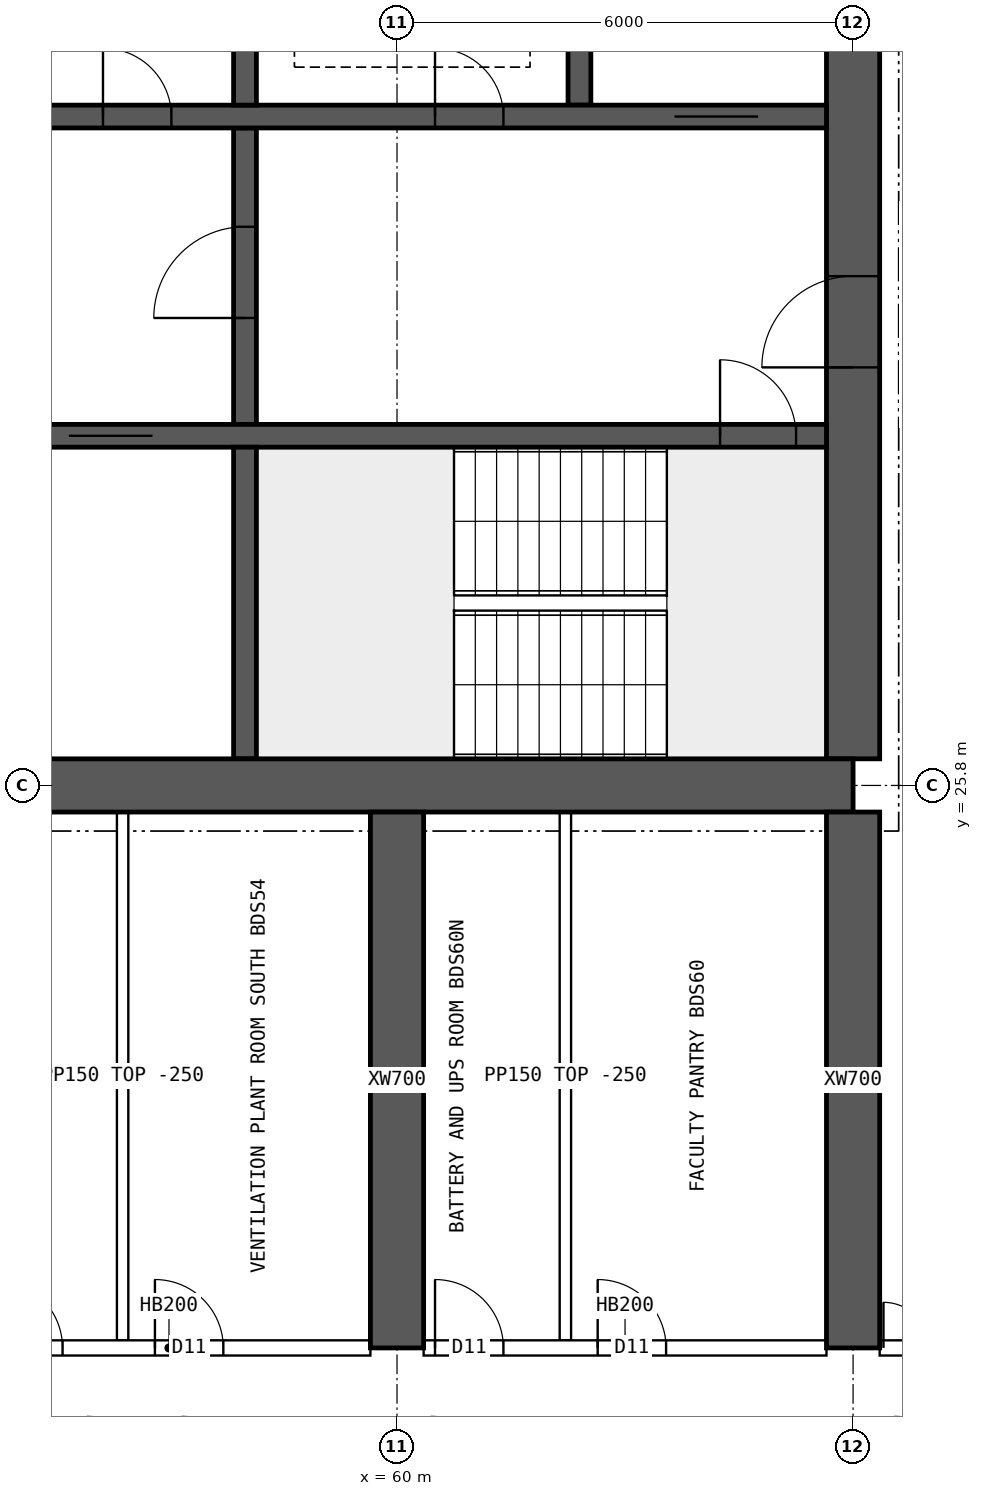
"""IFC4 building model, lengths in metres.
Left out: names, types, materials, properties, quantities, classifications, styles, units other than length and angle.
Written with IfcOpenShell. Run it as: python <this file> out.ifc"""

import sys

from ifc_helpers import new_model, si_unit, direction, frame, frame_2d, origin, place, context, subcontext, project, spatial, rectangle, extrude, element, fill, save


model = new_model("IFC4")
c1 = context("Model", 3, precision=1e-05, world=origin(), true_north=direction((0.0, 1.0)))
c2 = subcontext(c1, "Body", "Model", "MODEL_VIEW")
j1 = project(units=[si_unit("LENGTHUNIT", "METRE"), si_unit("PLANEANGLEUNIT", "RADIAN")], contexts=[c1])
p1 = place(None, origin())
s1 = spatial("IfcSite", under=j1, at=p1, CompositionType="ELEMENT")
p2 = place(p1, origin())
s2 = spatial("IfcBuilding", under=s1, at=p2, CompositionType="ELEMENT")
p3 = place(p2, frame((0.0, 0.0, 220.3)))
s3 = spatial("IfcBuildingStorey", under=s2, at=p3, CompositionType="ELEMENT", Elevation=220.3)
p4 = place(p3, frame((18.0, 25.8, 0.0), z_axis=(0.0, 0.0, 1.0), x_axis=(1.0, 0.0, 0.0)))
e1 = element("IfcWall", 1, at=p4, inside=s3, PredefinedType="SHEAR", context=c2, shape_type="SweptSolid", body=[
    extrude(rectangle(XDim=48.0, YDim=0.7, at=frame_2d((24.0, 0.0))), origin(), (0.0, 0.0, 1.0), 3.75),
])
p5 = place(p3, frame((66.0, 26.15, 0.0), z_axis=(0.0, 0.0, 1.0), x_axis=(0.0, 1.0, 0.0)))
e2 = element("IfcWall", 2, at=p5, inside=s3, PredefinedType="SHEAR", context=c2, shape_type="SweptSolid", body=[
    extrude(rectangle(XDim=11.7, YDim=0.7, at=frame_2d((5.85, 0.0))), origin(), (0.0, 0.0, 1.0), 3.75),
])
p6 = place(p5, frame((5.15, 0.0, 0.0)))
e3 = element("IfcOpeningElement", 3, at=p6, cuts=e2, PredefinedType="OPENING", context=c2, shape_type="SweptSolid", body=[
    extrude(rectangle(XDim=1.2, YDim=2.1, at=frame_2d((0.6, 1.05))), frame((0.0, 0.36, 0.0), z_axis=(0.0, -1.0, 0.0), x_axis=(1.0, 0.0, 0.0)), (0.0, 0.0, 1.0), 0.72),
])
p7 = place(p3, frame((18.35, 30.4, 0.0), z_axis=(0.0, 0.0, 1.0), x_axis=(1.0, 0.0, 0.0)))
e4 = element("IfcWall", 4, at=p7, inside=s3, PredefinedType="SHEAR", context=c2, shape_type="SweptSolid", body=[
    extrude(rectangle(XDim=47.3, YDim=0.3, at=frame_2d((23.65, 0.0))), origin(), (0.0, 0.0, 1.0), 3.75),
])
p8 = place(p7, frame((0.4, 0.0, 0.0)))
e5 = element("IfcOpeningElement", 5, at=p8, cuts=e4, PredefinedType="OPENING", context=c2, shape_type="SweptSolid", body=[
    extrude(rectangle(XDim=1.0, YDim=2.1, at=frame_2d((0.5, 1.05))), frame((0.0, 0.16, 0.0), z_axis=(0.0, -1.0, 0.0), x_axis=(1.0, 0.0, 0.0)), (0.0, 0.0, 1.0), 0.32),
])
p9 = place(p7, frame((45.9, 0.0, 0.0)))
e6 = element("IfcOpeningElement", 6, at=p9, cuts=e4, PredefinedType="OPENING", context=c2, shape_type="SweptSolid", body=[
    extrude(rectangle(XDim=1.0, YDim=2.1, at=frame_2d((0.5, 1.05))), frame((0.0, 0.16, 0.0), z_axis=(0.0, -1.0, 0.0), x_axis=(1.0, 0.0, 0.0)), (0.0, 0.0, 1.0), 0.32),
])
p10 = place(p7, frame((8.4, 0.0, 0.0)))
e7 = element("IfcOpeningElement", 7, at=p10, cuts=e4, PredefinedType="OPENING", context=c2, shape_type="SweptSolid", body=[
    extrude(rectangle(XDim=1.1, YDim=2.1, at=frame_2d((0.55, 1.05))), frame((0.0, 0.16, 0.0), z_axis=(0.0, -1.0, 0.0), x_axis=(1.0, 0.0, 0.0)), (0.0, 0.0, 1.0), 0.32),
])
p11 = place(p7, frame((11.0, 0.0, 0.0)))
e8 = element("IfcOpeningElement", 8, at=p11, cuts=e4, PredefinedType="OPENING", context=c2, shape_type="SweptSolid", body=[
    extrude(rectangle(XDim=1.1, YDim=2.1, at=frame_2d((0.55, 1.05))), frame((0.0, 0.16, 0.0), z_axis=(0.0, -1.0, 0.0), x_axis=(1.0, 0.0, 0.0)), (0.0, 0.0, 1.0), 0.32),
])
p12 = place(p7, frame((13.6, 0.0, 0.0)))
e9 = element("IfcOpeningElement", 9, at=p12, cuts=e4, PredefinedType="OPENING", context=c2, shape_type="SweptSolid", body=[
    extrude(rectangle(XDim=1.1, YDim=2.1, at=frame_2d((0.55, 1.05))), frame((0.0, 0.16, 0.0), z_axis=(0.0, -1.0, 0.0), x_axis=(1.0, 0.0, 0.0)), (0.0, 0.0, 1.0), 0.32),
])
p13 = place(p7, frame((16.2, 0.0, 0.0)))
e10 = element("IfcOpeningElement", 10, at=p13, cuts=e4, PredefinedType="OPENING", context=c2, shape_type="SweptSolid", body=[
    extrude(rectangle(XDim=1.1, YDim=2.1, at=frame_2d((0.55, 1.05))), frame((0.0, 0.16, 0.0), z_axis=(0.0, -1.0, 0.0), x_axis=(1.0, 0.0, 0.0)), (0.0, 0.0, 1.0), 0.32),
])
p14 = place(p7, frame((18.975, 0.0, 0.0)))
e11 = element("IfcOpeningElement", 11, at=p14, cuts=e4, PredefinedType="OPENING", context=c2, shape_type="SweptSolid", body=[
    extrude(rectangle(XDim=0.9, YDim=2.1, at=frame_2d((0.45, 1.05))), frame((0.0, 0.16, 0.0), z_axis=(0.0, -1.0, 0.0), x_axis=(1.0, 0.0, 0.0)), (0.0, 0.0, 1.0), 0.32),
])
p15 = place(p7, frame((24.475, 0.0, 0.0)))
e12 = element("IfcOpeningElement", 12, at=p15, cuts=e4, PredefinedType="OPENING", context=c2, shape_type="SweptSolid", body=[
    extrude(rectangle(XDim=0.9, YDim=2.1, at=frame_2d((0.45, 1.05))), frame((0.0, 0.16, 0.0), z_axis=(0.0, -1.0, 0.0), x_axis=(1.0, 0.0, 0.0)), (0.0, 0.0, 1.0), 0.32),
])
p16 = place(p7, frame((30.267, 0.0, 0.0)))
e13 = element("IfcOpeningElement", 13, at=p16, cuts=e4, PredefinedType="OPENING", context=c2, shape_type="SweptSolid", body=[
    extrude(rectangle(XDim=1.1, YDim=2.1, at=frame_2d((0.55, 1.05))), frame((0.0, 0.16, 0.0), z_axis=(0.0, -1.0, 0.0), x_axis=(1.0, 0.0, 0.0)), (0.0, 0.0, 1.0), 0.32),
])
p17 = place(p7, frame((33.8, 0.0, 0.0)))
e14 = element("IfcOpeningElement", 14, at=p17, cuts=e4, PredefinedType="OPENING", context=c2, shape_type="SweptSolid", body=[
    extrude(rectangle(XDim=1.1, YDim=2.1, at=frame_2d((0.55, 1.05))), frame((0.0, 0.16, 0.0), z_axis=(0.0, -1.0, 0.0), x_axis=(1.0, 0.0, 0.0)), (0.0, 0.0, 1.0), 0.32),
])
p18 = place(p7, frame((37.333, 0.0, 0.0)))
e15 = element("IfcOpeningElement", 15, at=p18, cuts=e4, PredefinedType="OPENING", context=c2, shape_type="SweptSolid", body=[
    extrude(rectangle(XDim=1.1, YDim=2.1, at=frame_2d((0.55, 1.05))), frame((0.0, 0.16, 0.0), z_axis=(0.0, -1.0, 0.0), x_axis=(1.0, 0.0, 0.0)), (0.0, 0.0, 1.0), 0.32),
])
p19 = place(p3, frame((18.35, 34.6, 0.0), z_axis=(0.0, 0.0, 1.0), x_axis=(1.0, 0.0, 0.0)))
e16 = element("IfcWall", 16, at=p19, inside=s3, PredefinedType="SHEAR", context=c2, shape_type="SweptSolid", body=[
    extrude(rectangle(XDim=47.3, YDim=0.3, at=frame_2d((23.65, 0.0))), origin(), (0.0, 0.0, 1.0), 3.75),
])
p20 = place(p19, frame((0.9, 0.0, 0.0)))
e17 = element("IfcOpeningElement", 17, at=p20, cuts=e16, PredefinedType="OPENING", context=c2, shape_type="SweptSolid", body=[
    extrude(rectangle(XDim=1.1, YDim=2.1, at=frame_2d((0.55, 1.05))), frame((0.0, 0.16, 0.0), z_axis=(0.0, -1.0, 0.0), x_axis=(1.0, 0.0, 0.0)), (0.0, 0.0, 1.0), 0.32),
])
p21 = place(p19, frame((45.3, 0.0, 0.0)))
e18 = element("IfcOpeningElement", 18, at=p21, cuts=e16, PredefinedType="OPENING", context=c2, shape_type="SweptSolid", body=[
    extrude(rectangle(XDim=1.1, YDim=2.1, at=frame_2d((0.55, 1.05))), frame((0.0, 0.16, 0.0), z_axis=(0.0, -1.0, 0.0), x_axis=(1.0, 0.0, 0.0)), (0.0, 0.0, 1.0), 0.32),
])
p22 = place(p19, frame((4.25, 0.0, 0.0)))
e19 = element("IfcOpeningElement", 19, at=p22, cuts=e16, PredefinedType="OPENING", context=c2, shape_type="SweptSolid", body=[
    extrude(rectangle(XDim=0.9, YDim=2.1, at=frame_2d((0.45, 1.05))), frame((0.0, 0.16, 0.0), z_axis=(0.0, -1.0, 0.0), x_axis=(1.0, 0.0, 0.0)), (0.0, 0.0, 1.0), 0.32),
])
p23 = place(p19, frame((42.15, 0.0, 0.0)))
e20 = element("IfcOpeningElement", 20, at=p23, cuts=e16, PredefinedType="OPENING", context=c2, shape_type="SweptSolid", body=[
    extrude(rectangle(XDim=0.9, YDim=2.1, at=frame_2d((0.45, 1.05))), frame((0.0, 0.16, 0.0), z_axis=(0.0, -1.0, 0.0), x_axis=(1.0, 0.0, 0.0)), (0.0, 0.0, 1.0), 0.32),
])
p24 = place(p19, frame((9.025, 0.0, 0.0)))
e21 = element("IfcOpeningElement", 21, at=p24, cuts=e16, PredefinedType="OPENING", context=c2, shape_type="SweptSolid", body=[
    extrude(rectangle(XDim=0.9, YDim=2.1, at=frame_2d((0.45, 1.05))), frame((0.0, 0.16, 0.0), z_axis=(0.0, -1.0, 0.0), x_axis=(1.0, 0.0, 0.0)), (0.0, 0.0, 1.0), 0.32),
])
p25 = place(p19, frame((12.999, 0.0, 0.0)))
e22 = element("IfcOpeningElement", 22, at=p25, cuts=e16, PredefinedType="OPENING", context=c2, shape_type="SweptSolid", body=[
    extrude(rectangle(XDim=0.9, YDim=2.1, at=frame_2d((0.45, 1.05))), frame((0.0, 0.16, 0.0), z_axis=(0.0, -1.0, 0.0), x_axis=(1.0, 0.0, 0.0)), (0.0, 0.0, 1.0), 0.32),
])
p26 = place(p19, frame((16.646, 0.0, 0.0)))
e23 = element("IfcOpeningElement", 23, at=p26, cuts=e16, PredefinedType="OPENING", context=c2, shape_type="SweptSolid", body=[
    extrude(rectangle(XDim=0.9, YDim=2.1, at=frame_2d((0.45, 1.05))), frame((0.0, 0.16, 0.0), z_axis=(0.0, -1.0, 0.0), x_axis=(1.0, 0.0, 0.0)), (0.0, 0.0, 1.0), 0.32),
])
p27 = place(p19, frame((20.405, 0.0, 0.0)))
e24 = element("IfcOpeningElement", 24, at=p27, cuts=e16, PredefinedType="OPENING", context=c2, shape_type="SweptSolid", body=[
    extrude(rectangle(XDim=0.9, YDim=2.1, at=frame_2d((0.45, 1.05))), frame((0.0, 0.16, 0.0), z_axis=(0.0, -1.0, 0.0), x_axis=(1.0, 0.0, 0.0)), (0.0, 0.0, 1.0), 0.32),
])
p28 = place(p19, frame((24.811, 0.0, 0.0)))
e25 = element("IfcOpeningElement", 25, at=p28, cuts=e16, PredefinedType="OPENING", context=c2, shape_type="SweptSolid", body=[
    extrude(rectangle(XDim=0.9, YDim=2.1, at=frame_2d((0.45, 1.05))), frame((0.0, 0.16, 0.0), z_axis=(0.0, -1.0, 0.0), x_axis=(1.0, 0.0, 0.0)), (0.0, 0.0, 1.0), 0.32),
])
p29 = place(p19, frame((27.608, 0.0, 0.0)))
e26 = element("IfcOpeningElement", 26, at=p29, cuts=e16, PredefinedType="OPENING", context=c2, shape_type="SweptSolid", body=[
    extrude(rectangle(XDim=0.9, YDim=2.1, at=frame_2d((0.45, 1.05))), frame((0.0, 0.16, 0.0), z_axis=(0.0, -1.0, 0.0), x_axis=(1.0, 0.0, 0.0)), (0.0, 0.0, 1.0), 0.32),
])
p30 = place(p19, frame((29.575, 0.0, 0.0)))
e27 = element("IfcOpeningElement", 27, at=p30, cuts=e16, PredefinedType="OPENING", context=c2, shape_type="SweptSolid", body=[
    extrude(rectangle(XDim=0.9, YDim=2.1, at=frame_2d((0.45, 1.05))), frame((0.0, 0.16, 0.0), z_axis=(0.0, -1.0, 0.0), x_axis=(1.0, 0.0, 0.0)), (0.0, 0.0, 1.0), 0.32),
])
p31 = place(p19, frame((32.007, 0.0, 0.0)))
e28 = element("IfcOpeningElement", 28, at=p31, cuts=e16, PredefinedType="OPENING", context=c2, shape_type="SweptSolid", body=[
    extrude(rectangle(XDim=0.9, YDim=2.1, at=frame_2d((0.45, 1.05))), frame((0.0, 0.16, 0.0), z_axis=(0.0, -1.0, 0.0), x_axis=(1.0, 0.0, 0.0)), (0.0, 0.0, 1.0), 0.32),
])
p32 = place(p19, frame((34.742, 0.0, 0.0)))
e29 = element("IfcOpeningElement", 29, at=p32, cuts=e16, PredefinedType="OPENING", context=c2, shape_type="SweptSolid", body=[
    extrude(rectangle(XDim=0.9, YDim=2.1, at=frame_2d((0.45, 1.05))), frame((0.0, 0.16, 0.0), z_axis=(0.0, -1.0, 0.0), x_axis=(1.0, 0.0, 0.0)), (0.0, 0.0, 1.0), 0.32),
])
p33 = place(p19, frame((37.781, 0.0, 0.0)))
e30 = element("IfcOpeningElement", 30, at=p33, cuts=e16, PredefinedType="OPENING", context=c2, shape_type="SweptSolid", body=[
    extrude(rectangle(XDim=0.9, YDim=2.1, at=frame_2d((0.45, 1.05))), frame((0.0, 0.16, 0.0), z_axis=(0.0, -1.0, 0.0), x_axis=(1.0, 0.0, 0.0)), (0.0, 0.0, 1.0), 0.32),
])
p34 = place(p3, frame((58.0, 26.15, 0.0), z_axis=(0.0, 0.0, 1.0), x_axis=(0.0, 1.0, 0.0)))
e31 = element("IfcWall", 31, at=p34, inside=s3, PredefinedType="SHEAR", context=c2, shape_type="SweptSolid", body=[
    extrude(rectangle(XDim=4.1, YDim=0.3, at=frame_2d((2.05, 0.0))), origin(), (0.0, 0.0, 1.0), 3.75),
])
p35 = place(p3, frame((58.0, 30.55, 0.0), z_axis=(0.0, 0.0, 1.0), x_axis=(0.0, 1.0, 0.0)))
e32 = element("IfcWall", 32, at=p35, inside=s3, PredefinedType="SHEAR", context=c2, shape_type="SweptSolid", body=[
    extrude(rectangle(XDim=3.9, YDim=0.3, at=frame_2d((1.95, 0.0))), origin(), (0.0, 0.0, 1.0), 3.75),
])
p36 = place(p35, frame((1.4, 0.0, 0.0)))
e33 = element("IfcOpeningElement", 33, at=p36, cuts=e32, PredefinedType="OPENING", context=c2, shape_type="SweptSolid", body=[
    extrude(rectangle(XDim=1.2, YDim=2.1, at=frame_2d((0.6, 1.05))), frame((0.0, 0.16, 0.0), z_axis=(0.0, -1.0, 0.0), x_axis=(1.0, 0.0, 0.0)), (0.0, 0.0, 1.0), 0.32),
])
for number, where, z_axis, x_axis in (
    (34, (62.4, 34.75, 0.0), (0.0, 0.0, 1.0), (0.0, 1.0, 0.0)),
    (35, (58.0, 34.75, 0.0), (0.0, 0.0, 1.0), (0.0, 1.0, 0.0)),
):
    element("IfcWall", number, at=place(p3, frame(where, z_axis=z_axis, x_axis=x_axis)), inside=s3, PredefinedType="SHEAR", context=c2, shape_type="SweptSolid", body=[
        extrude(rectangle(XDim=3.1, YDim=0.3, at=frame_2d((1.55, 0.0))), origin(), (0.0, 0.0, 1.0), 3.75),
    ])
for number, where, z_axis, x_axis in (
    (36, (60.0, 18.4, 0.0), (0.0, 0.0, 1.0), (0.0, 1.0, 0.0)),
    (37, (66.0, 18.4, 0.0), (0.0, 0.0, 1.0), (0.0, 1.0, 0.0)),
):
    element("IfcWall", number, at=place(p3, frame(where, z_axis=z_axis, x_axis=x_axis)), inside=s3, PredefinedType="SHEAR", context=c2, shape_type="SweptSolid", body=[
        extrude(rectangle(XDim=7.05, YDim=0.7, at=frame_2d((3.525, 0.0))), origin(), (0.0, 0.0, 1.0), 3.75),
    ])
p37 = place(p3, frame((54.35, 18.4, 0.0), z_axis=(0.0, 0.0, 1.0), x_axis=(1.0, 0.0, 0.0)))
e38 = element("IfcWall", 38, at=p37, inside=s3, PredefinedType="SOLIDWALL", context=c2, shape_type="SweptSolid", body=[
    extrude(rectangle(XDim=5.3, YDim=0.2, at=frame_2d((2.65, 0.0))), origin(), (0.0, 0.0, 1.0), 3.5),
])
p38 = place(p37, frame((0.35, 0.0, 0.0)))
e39 = element("IfcOpeningElement", 39, at=p38, cuts=e38, PredefinedType="OPENING", context=c2, shape_type="SweptSolid", body=[
    extrude(rectangle(XDim=0.9, YDim=2.1, at=frame_2d((0.45, 1.05))), frame((0.0, 0.11, 0.0), z_axis=(0.0, -1.0, 0.0), x_axis=(1.0, 0.0, 0.0)), (0.0, 0.0, 1.0), 0.22),
])
p39 = place(p37, frame((2.465, 0.0, 0.0)))
e40 = element("IfcOpeningElement", 40, at=p39, cuts=e38, PredefinedType="OPENING", context=c2, shape_type="SweptSolid", body=[
    extrude(rectangle(XDim=0.9, YDim=2.1, at=frame_2d((0.45, 1.05))), frame((0.0, 0.11, 0.0), z_axis=(0.0, -1.0, 0.0), x_axis=(1.0, 0.0, 0.0)), (0.0, 0.0, 1.0), 0.22),
])
p40 = place(p3, frame((60.35, 18.4, 0.0), z_axis=(0.0, 0.0, 1.0), x_axis=(1.0, 0.0, 0.0)))
e41 = element("IfcWall", 41, at=p40, inside=s3, PredefinedType="SOLIDWALL", context=c2, shape_type="SweptSolid", body=[
    extrude(rectangle(XDim=5.3, YDim=0.2, at=frame_2d((2.65, 0.0))), origin(), (0.0, 0.0, 1.0), 3.5),
])
p41 = place(p40, frame((0.15, 0.0, 0.0)))
e42 = element("IfcOpeningElement", 42, at=p41, cuts=e41, PredefinedType="OPENING", context=c2, shape_type="SweptSolid", body=[
    extrude(rectangle(XDim=0.9, YDim=2.1, at=frame_2d((0.45, 1.05))), frame((0.0, 0.11, 0.0), z_axis=(0.0, -1.0, 0.0), x_axis=(1.0, 0.0, 0.0)), (0.0, 0.0, 1.0), 0.22),
])
p42 = place(p40, frame((2.29, 0.0, 0.0)))
e43 = element("IfcOpeningElement", 43, at=p42, cuts=e41, PredefinedType="OPENING", context=c2, shape_type="SweptSolid", body=[
    extrude(rectangle(XDim=0.9, YDim=2.1, at=frame_2d((0.45, 1.05))), frame((0.0, 0.11, 0.0), z_axis=(0.0, -1.0, 0.0), x_axis=(1.0, 0.0, 0.0)), (0.0, 0.0, 1.0), 0.22),
])
p43 = place(p3, frame((66.35, 18.4, 0.0), z_axis=(0.0, 0.0, 1.0), x_axis=(1.0, 0.0, 0.0)))
e44 = element("IfcWall", 44, at=p43, inside=s3, PredefinedType="SOLIDWALL", context=c2, shape_type="SweptSolid", body=[
    extrude(rectangle(XDim=2.05, YDim=0.2, at=frame_2d((1.025, 0.0))), origin(), (0.0, 0.0, 1.0), 3.5),
])
p44 = place(p43, frame((0.05, 0.0, 0.0)))
e45 = element("IfcOpeningElement", 45, at=p44, cuts=e44, PredefinedType="OPENING", context=c2, shape_type="SweptSolid", body=[
    extrude(rectangle(XDim=1.2, YDim=2.1, at=frame_2d((0.6, 1.05))), frame((0.0, 0.11, 0.0), z_axis=(0.0, -1.0, 0.0), x_axis=(1.0, 0.0, 0.0)), (0.0, 0.0, 1.0), 0.22),
])
for number, where, z_axis, x_axis in (
    (46, (56.39, 18.5, 0.0), (0.0, 0.0, 1.0), (0.0, 1.0, 0.0)),
    (47, (62.215, 18.5, 0.0), (0.0, 0.0, 1.0), (0.0, 1.0, 0.0)),
):
    element("IfcWall", number, at=place(p3, frame(where, z_axis=z_axis, x_axis=x_axis)), inside=s3, PredefinedType="PARTITIONING", context=c2, shape_type="SweptSolid", body=[
        extrude(rectangle(XDim=6.95, YDim=0.15, at=frame_2d((3.475, 0.0))), origin(), (0.0, 0.0, 1.0), 3.5),
    ])
p45 = place(p6, origin())
e48 = element("IfcDoor", 48, at=p45, inside=s3, OperationType="SINGLE_SWING_LEFT", PredefinedType="DOOR", context=c2, shape_type="SweptSolid", body=[
    extrude(rectangle(XDim=1.2, YDim=2.1, at=frame_2d((0.6, 1.05))), frame((0.0, 0.025, 0.0), z_axis=(0.0, -1.0, 0.0), x_axis=(1.0, 0.0, 0.0)), (0.0, 0.0, 1.0), 0.05),
])
fill(e3, e48)
p46 = place(p9, origin())
e49 = element("IfcDoor", 49, at=p46, inside=s3, OperationType="SINGLE_SWING_LEFT", PredefinedType="DOOR", context=c2, shape_type="SweptSolid", body=[
    extrude(rectangle(XDim=1.0, YDim=2.1, at=frame_2d((0.5, 1.05))), frame((0.0, 0.025, 0.0), z_axis=(0.0, -1.0, 0.0), x_axis=(1.0, 0.0, 0.0)), (0.0, 0.0, 1.0), 0.05),
])
fill(e6, e49)
p47 = place(p21, origin())
e50 = element("IfcDoor", 50, at=p47, inside=s3, OperationType="DOUBLE_DOOR_SLIDING", PredefinedType="DOOR", context=c2, shape_type="SweptSolid", body=[
    extrude(rectangle(XDim=1.1, YDim=2.1, at=frame_2d((0.55, 1.05))), frame((0.0, 0.025, 0.0), z_axis=(0.0, -1.0, 0.0), x_axis=(1.0, 0.0, 0.0)), (0.0, 0.0, 1.0), 0.05),
])
fill(e18, e50)
p48 = place(p23, origin())
e51 = element("IfcDoor", 51, at=p48, inside=s3, OperationType="SINGLE_SWING_LEFT", PredefinedType="DOOR", context=c2, shape_type="SweptSolid", body=[
    extrude(rectangle(XDim=0.9, YDim=2.1, at=frame_2d((0.45, 1.05))), frame((0.0, 0.025, 0.0), z_axis=(0.0, -1.0, 0.0), x_axis=(1.0, 0.0, 0.0)), (0.0, 0.0, 1.0), 0.05),
])
fill(e20, e51)
p49 = place(p36, origin())
e52 = element("IfcDoor", 52, at=p49, inside=s3, OperationType="SINGLE_SWING_LEFT", PredefinedType="DOOR", context=c2, shape_type="SweptSolid", body=[
    extrude(rectangle(XDim=1.2, YDim=2.1, at=frame_2d((0.6, 1.05))), frame((0.0, 0.025, 0.0), z_axis=(0.0, -1.0, 0.0), x_axis=(1.0, 0.0, 0.0)), (0.0, 0.0, 1.0), 0.05),
])
fill(e33, e52)
p50 = place(p33, origin())
e53 = element("IfcDoor", 53, at=p50, inside=s3, OperationType="SINGLE_SWING_LEFT", PredefinedType="DOOR", context=c2, shape_type="SweptSolid", body=[
    extrude(rectangle(XDim=0.9, YDim=2.1, at=frame_2d((0.45, 1.05))), frame((0.0, 0.025, 0.0), z_axis=(0.0, -1.0, 0.0), x_axis=(1.0, 0.0, 0.0)), (0.0, 0.0, 1.0), 0.05),
])
fill(e30, e53)
p51 = place(p18, origin())
e54 = element("IfcDoor", 54, at=p51, inside=s3, OperationType="DOUBLE_DOOR_SLIDING", PredefinedType="DOOR", context=c2, shape_type="SweptSolid", body=[
    extrude(rectangle(XDim=1.1, YDim=2.1, at=frame_2d((0.55, 1.05))), frame((0.0, 0.025, 0.0), z_axis=(0.0, -1.0, 0.0), x_axis=(1.0, 0.0, 0.0)), (0.0, 0.0, 1.0), 0.05),
])
fill(e15, e54)
p52 = place(p44, origin())
e55 = element("IfcDoor", 55, at=p52, inside=s3, OperationType="DOUBLE_DOOR_SINGLE_SWING", PredefinedType="DOOR", context=c2, shape_type="SweptSolid", body=[
    extrude(rectangle(XDim=1.2, YDim=2.1, at=frame_2d((0.6, 1.05))), frame((0.0, 0.025, 0.0), z_axis=(0.0, -1.0, 0.0), x_axis=(1.0, 0.0, 0.0)), (0.0, 0.0, 1.0), 0.05),
])
fill(e45, e55)
p53 = place(p38, origin())
e56 = element("IfcDoor", 56, at=p53, inside=s3, OperationType="SINGLE_SWING_LEFT", PredefinedType="DOOR", context=c2, shape_type="SweptSolid", body=[
    extrude(rectangle(XDim=0.9, YDim=2.1, at=frame_2d((0.45, 1.05))), frame((0.0, 0.025, 0.0), z_axis=(0.0, -1.0, 0.0), x_axis=(1.0, 0.0, 0.0)), (0.0, 0.0, 1.0), 0.05),
])
fill(e39, e56)
p54 = place(p39, origin())
e57 = element("IfcDoor", 57, at=p54, inside=s3, OperationType="SINGLE_SWING_LEFT", PredefinedType="DOOR", context=c2, shape_type="SweptSolid", body=[
    extrude(rectangle(XDim=0.9, YDim=2.1, at=frame_2d((0.45, 1.05))), frame((0.0, 0.025, 0.0), z_axis=(0.0, -1.0, 0.0), x_axis=(1.0, 0.0, 0.0)), (0.0, 0.0, 1.0), 0.05),
])
fill(e40, e57)
p55 = place(p41, origin())
e58 = element("IfcDoor", 58, at=p55, inside=s3, OperationType="SINGLE_SWING_LEFT", PredefinedType="DOOR", context=c2, shape_type="SweptSolid", body=[
    extrude(rectangle(XDim=0.9, YDim=2.1, at=frame_2d((0.45, 1.05))), frame((0.0, 0.025, 0.0), z_axis=(0.0, -1.0, 0.0), x_axis=(1.0, 0.0, 0.0)), (0.0, 0.0, 1.0), 0.05),
])
fill(e42, e58)
p56 = place(p42, origin())
e59 = element("IfcDoor", 59, at=p56, inside=s3, OperationType="SINGLE_SWING_LEFT", PredefinedType="DOOR", context=c2, shape_type="SweptSolid", body=[
    extrude(rectangle(XDim=0.9, YDim=2.1, at=frame_2d((0.45, 1.05))), frame((0.0, 0.025, 0.0), z_axis=(0.0, -1.0, 0.0), x_axis=(1.0, 0.0, 0.0)), (0.0, 0.0, 1.0), 0.05),
])
fill(e43, e59)
save(model, sys.argv[1])
